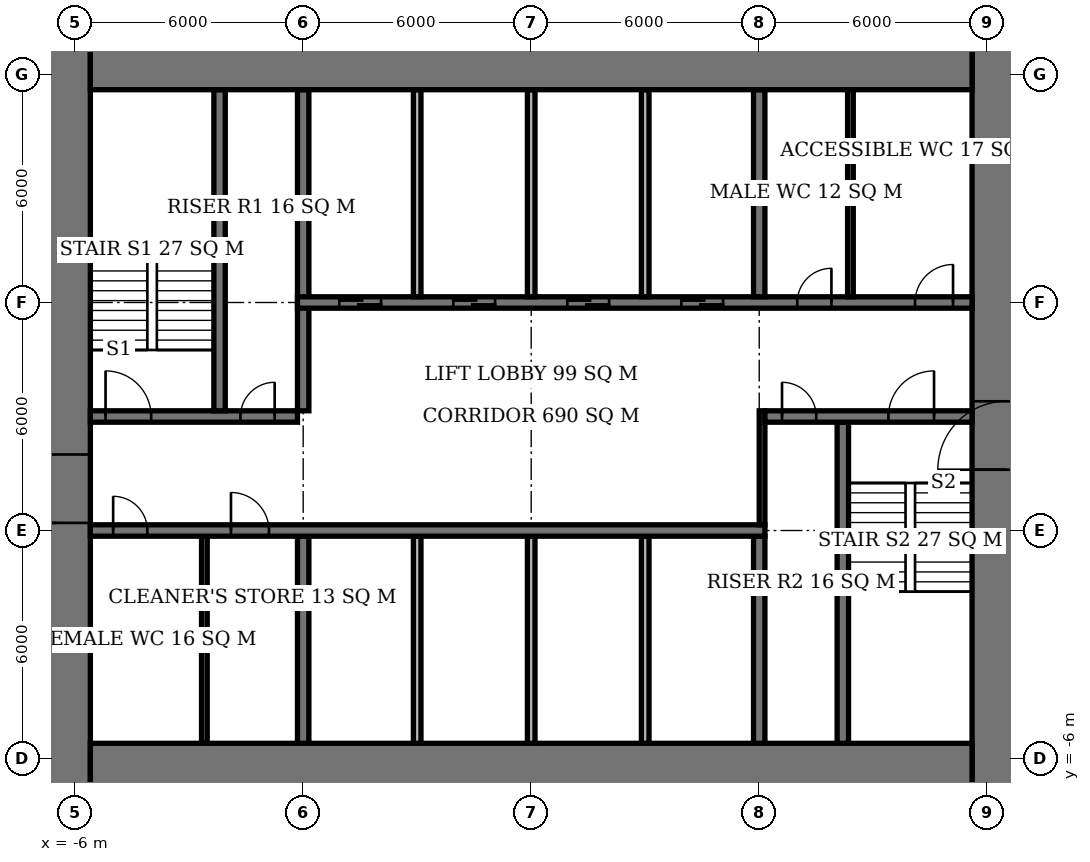
"""IFC4 building model, lengths in metres.
Left out: names, types, materials, properties, quantities, classifications, styles, units other than length and angle.
Written with IfcOpenShell. Run it as: python <this file> out.ifc"""

import sys

from ifc_helpers import new_model, si_unit, direction, frame, frame_2d, origin, place, context, subcontext, project, spatial, rectangle, extrude, element, fill, save


model = new_model("IFC4")
c1 = context("Model", 3, precision=1e-05, world=origin(), true_north=direction((0.0, 1.0)))
c2 = subcontext(c1, "Body", "Model", "MODEL_VIEW")
j1 = project(units=[si_unit("LENGTHUNIT", "METRE"), si_unit("PLANEANGLEUNIT", "RADIAN")], contexts=[c1])
p1 = place(None, origin())
s1 = spatial("IfcSite", under=j1, at=p1, CompositionType="ELEMENT")
p2 = place(p1, origin())
s2 = spatial("IfcBuilding", under=s1, at=p2, CompositionType="ELEMENT")
p3 = place(p2, frame((0.0, 0.0, 68.9)))
s3 = spatial("IfcBuildingStorey", under=s2, at=p3, CompositionType="ELEMENT", Elevation=68.9)
for number, where, z_axis, x_axis in (
    (1, (-5.6, -6.6, 0.0), (0.0, 0.0, 1.0), (1.0, 0.0, 0.0)),
    (2, (-5.6, 12.6, 0.0), (0.0, 0.0, 1.0), (1.0, 0.0, 0.0)),
):
    element("IfcWall", number, at=place(p3, frame(where, z_axis=z_axis, x_axis=x_axis)), inside=s3, PredefinedType="SHEAR", context=c2, shape_type="SweptSolid", body=[
        extrude(rectangle(XDim=23.2, YDim=2.0, at=frame_2d((11.6, 0.0))), origin(), (0.0, 0.0, 1.0), 3.9),
    ])
p4 = place(p3, frame((-6.5, -7.6, 0.0), z_axis=(0.0, 0.0, 1.0), x_axis=(0.0, 1.0, 0.0)))
e3 = element("IfcWall", 3, at=p4, inside=s3, PredefinedType="SHEAR", context=c2, shape_type="SweptSolid", body=[
    extrude(rectangle(XDim=21.2, YDim=1.8, at=frame_2d((10.6, 0.0))), origin(), (0.0, 0.0, 1.0), 3.9),
])
p5 = place(p4, frame((7.8, 0.0, 0.0)))
e4 = element("IfcOpeningElement", 4, at=p5, cuts=e3, PredefinedType="OPENING", context=c2, shape_type="SweptSolid", body=[
    extrude(rectangle(XDim=1.8, YDim=2.4, at=frame_2d((0.9, 1.2))), frame((0.0, 0.91, 0.0), z_axis=(0.0, -1.0, 0.0), x_axis=(1.0, 0.0, 0.0)), (0.0, 0.0, 1.0), 1.82),
])
p6 = place(p3, frame((18.5, -7.6, 0.0), z_axis=(0.0, 0.0, 1.0), x_axis=(0.0, 1.0, 0.0)))
e5 = element("IfcWall", 5, at=p6, inside=s3, PredefinedType="SHEAR", context=c2, shape_type="SweptSolid", body=[
    extrude(rectangle(XDim=21.2, YDim=1.8, at=frame_2d((10.6, 0.0))), origin(), (0.0, 0.0, 1.0), 3.9),
])
p7 = place(p6, frame((9.2, 0.0, 0.0)))
e6 = element("IfcOpeningElement", 6, at=p7, cuts=e5, PredefinedType="OPENING", context=c2, shape_type="SweptSolid", body=[
    extrude(rectangle(XDim=1.8, YDim=2.4, at=frame_2d((0.9, 1.2))), frame((0.0, 0.91, 0.0), z_axis=(0.0, -1.0, 0.0), x_axis=(1.0, 0.0, 0.0)), (0.0, 0.0, 1.0), 1.82),
])
p8 = place(p3, frame((-5.6, 0.0, 0.0), z_axis=(0.0, 0.0, 1.0), x_axis=(1.0, 0.0, 0.0)))
e7 = element("IfcWall", 7, at=p8, inside=s3, PredefinedType="SHEAR", context=c2, shape_type="SweptSolid", body=[
    extrude(rectangle(XDim=17.75, YDim=0.3, at=frame_2d((8.875, 0.0))), origin(), (0.0, 0.0, 1.0), 3.9),
])
p9 = place(p8, frame((0.6, 0.0, 0.0)))
e8 = element("IfcOpeningElement", 8, at=p9, cuts=e7, PredefinedType="OPENING", context=c2, shape_type="SweptSolid", body=[
    extrude(rectangle(XDim=0.9, YDim=2.1, at=frame_2d((0.45, 1.05))), frame((0.0, 0.16, 0.0), z_axis=(0.0, -1.0, 0.0), x_axis=(1.0, 0.0, 0.0)), (0.0, 0.0, 1.0), 0.32),
])
p10 = place(p8, frame((3.7, 0.0, 0.0)))
e9 = element("IfcOpeningElement", 9, at=p10, cuts=e7, PredefinedType="OPENING", context=c2, shape_type="SweptSolid", body=[
    extrude(rectangle(XDim=1.0, YDim=2.1, at=frame_2d((0.5, 1.05))), frame((0.0, 0.16, 0.0), z_axis=(0.0, -1.0, 0.0), x_axis=(1.0, 0.0, 0.0)), (0.0, 0.0, 1.0), 0.32),
])
p11 = place(p3, frame((-5.6, 3.0, 0.0), z_axis=(0.0, 0.0, 1.0), x_axis=(1.0, 0.0, 0.0)))
e10 = element("IfcWall", 10, at=p11, inside=s3, PredefinedType="SHEAR", context=c2, shape_type="SweptSolid", body=[
    extrude(rectangle(XDim=5.45, YDim=0.3, at=frame_2d((2.725, 0.0))), origin(), (0.0, 0.0, 1.0), 3.9),
])
p12 = place(p11, frame((0.4, 0.0, 0.0)))
e11 = element("IfcOpeningElement", 11, at=p12, cuts=e10, PredefinedType="OPENING", context=c2, shape_type="SweptSolid", body=[
    extrude(rectangle(XDim=1.2, YDim=2.1, at=frame_2d((0.6, 1.05))), frame((0.0, 0.16, 0.0), z_axis=(0.0, -1.0, 0.0), x_axis=(1.0, 0.0, 0.0)), (0.0, 0.0, 1.0), 0.32),
])
p13 = place(p11, frame((3.95, 0.0, 0.0)))
e12 = element("IfcOpeningElement", 12, at=p13, cuts=e10, PredefinedType="OPENING", context=c2, shape_type="SweptSolid", body=[
    extrude(rectangle(XDim=0.9, YDim=2.1, at=frame_2d((0.45, 1.05))), frame((0.0, 0.16, 0.0), z_axis=(0.0, -1.0, 0.0), x_axis=(1.0, 0.0, 0.0)), (0.0, 0.0, 1.0), 0.32),
])
p14 = place(p3, frame((12.15, 3.0, 0.0), z_axis=(0.0, 0.0, 1.0), x_axis=(1.0, 0.0, 0.0)))
e13 = element("IfcWall", 13, at=p14, inside=s3, PredefinedType="SHEAR", context=c2, shape_type="SweptSolid", body=[
    extrude(rectangle(XDim=5.45, YDim=0.3, at=frame_2d((2.725, 0.0))), origin(), (0.0, 0.0, 1.0), 3.9),
])
p15 = place(p14, frame((3.25, 0.0, 0.0)))
e14 = element("IfcOpeningElement", 14, at=p15, cuts=e13, PredefinedType="OPENING", context=c2, shape_type="SweptSolid", body=[
    extrude(rectangle(XDim=1.2, YDim=2.1, at=frame_2d((0.6, 1.05))), frame((0.0, 0.16, 0.0), z_axis=(0.0, -1.0, 0.0), x_axis=(1.0, 0.0, 0.0)), (0.0, 0.0, 1.0), 0.32),
])
p16 = place(p14, frame((0.45, 0.0, 0.0)))
e15 = element("IfcOpeningElement", 15, at=p16, cuts=e13, PredefinedType="OPENING", context=c2, shape_type="SweptSolid", body=[
    extrude(rectangle(XDim=0.9, YDim=2.1, at=frame_2d((0.45, 1.05))), frame((0.0, 0.16, 0.0), z_axis=(0.0, -1.0, 0.0), x_axis=(1.0, 0.0, 0.0)), (0.0, 0.0, 1.0), 0.32),
])
p17 = place(p3, frame((-0.15, 6.0, 0.0), z_axis=(0.0, 0.0, 1.0), x_axis=(1.0, 0.0, 0.0)))
e16 = element("IfcWall", 16, at=p17, inside=s3, PredefinedType="SHEAR", context=c2, shape_type="SweptSolid", body=[
    extrude(rectangle(XDim=17.75, YDim=0.3, at=frame_2d((8.875, 0.0))), origin(), (0.0, 0.0, 1.0), 3.9),
])
p18 = place(p17, frame((13.15, 0.0, 0.0)))
e17 = element("IfcOpeningElement", 17, at=p18, cuts=e16, PredefinedType="OPENING", context=c2, shape_type="SweptSolid", body=[
    extrude(rectangle(XDim=0.9, YDim=2.1, at=frame_2d((0.45, 1.05))), frame((0.0, 0.16, 0.0), z_axis=(0.0, -1.0, 0.0), x_axis=(1.0, 0.0, 0.0)), (0.0, 0.0, 1.0), 0.32),
])
p19 = place(p17, frame((16.25, 0.0, 0.0)))
e18 = element("IfcOpeningElement", 18, at=p19, cuts=e16, PredefinedType="OPENING", context=c2, shape_type="SweptSolid", body=[
    extrude(rectangle(XDim=1.0, YDim=2.1, at=frame_2d((0.5, 1.05))), frame((0.0, 0.16, 0.0), z_axis=(0.0, -1.0, 0.0), x_axis=(1.0, 0.0, 0.0)), (0.0, 0.0, 1.0), 0.32),
])
p20 = place(p17, frame((1.1, 0.0, 0.0)))
e19 = element("IfcOpeningElement", 19, at=p20, cuts=e16, PredefinedType="OPENING", context=c2, shape_type="SweptSolid", body=[
    extrude(rectangle(XDim=1.1, YDim=2.1, at=frame_2d((0.55, 1.05))), frame((0.0, 0.16, 0.0), z_axis=(0.0, -1.0, 0.0), x_axis=(1.0, 0.0, 0.0)), (0.0, 0.0, 1.0), 0.32),
])
p21 = place(p17, frame((4.1, 0.0, 0.0)))
e20 = element("IfcOpeningElement", 20, at=p21, cuts=e16, PredefinedType="OPENING", context=c2, shape_type="SweptSolid", body=[
    extrude(rectangle(XDim=1.1, YDim=2.1, at=frame_2d((0.55, 1.05))), frame((0.0, 0.16, 0.0), z_axis=(0.0, -1.0, 0.0), x_axis=(1.0, 0.0, 0.0)), (0.0, 0.0, 1.0), 0.32),
])
p22 = place(p17, frame((7.1, 0.0, 0.0)))
e21 = element("IfcOpeningElement", 21, at=p22, cuts=e16, PredefinedType="OPENING", context=c2, shape_type="SweptSolid", body=[
    extrude(rectangle(XDim=1.1, YDim=2.1, at=frame_2d((0.55, 1.05))), frame((0.0, 0.16, 0.0), z_axis=(0.0, -1.0, 0.0), x_axis=(1.0, 0.0, 0.0)), (0.0, 0.0, 1.0), 0.32),
])
p23 = place(p17, frame((10.1, 0.0, 0.0)))
e22 = element("IfcOpeningElement", 22, at=p23, cuts=e16, PredefinedType="OPENING", context=c2, shape_type="SweptSolid", body=[
    extrude(rectangle(XDim=1.1, YDim=2.1, at=frame_2d((0.55, 1.05))), frame((0.0, 0.16, 0.0), z_axis=(0.0, -1.0, 0.0), x_axis=(1.0, 0.0, 0.0)), (0.0, 0.0, 1.0), 0.32),
])
p24 = place(p3, frame((0.0, -5.6, 0.0), z_axis=(0.0, 0.0, 1.0), x_axis=(0.0, 1.0, 0.0)))
e23 = element("IfcWall", 23, at=p24, inside=s3, PredefinedType="SHEAR", context=c2, shape_type="SweptSolid", body=[
    extrude(rectangle(XDim=5.45, YDim=0.3, at=frame_2d((2.725, 0.0))), origin(), (0.0, 0.0, 1.0), 3.9),
])
p25 = place(p3, frame((0.0, 3.15, 0.0), z_axis=(0.0, 0.0, 1.0), x_axis=(0.0, 1.0, 0.0)))
e24 = element("IfcWall", 24, at=p25, inside=s3, PredefinedType="SHEAR", context=c2, shape_type="SweptSolid", body=[
    extrude(rectangle(XDim=8.45, YDim=0.3, at=frame_2d((4.225, 0.0))), origin(), (0.0, 0.0, 1.0), 3.9),
])
for number, where, z_axis, x_axis in (
    (25, (12.0, -5.6, 0.0), (0.0, 0.0, 1.0), (0.0, 1.0, 0.0)),
    (26, (12.0, 6.15, 0.0), (0.0, 0.0, 1.0), (0.0, 1.0, 0.0)),
):
    element("IfcWall", number, at=place(p3, frame(where, z_axis=z_axis, x_axis=x_axis)), inside=s3, PredefinedType="SHEAR", context=c2, shape_type="SweptSolid", body=[
        extrude(rectangle(XDim=5.45, YDim=0.3, at=frame_2d((2.725, 0.0))), origin(), (0.0, 0.0, 1.0), 3.9),
    ])
for number, where, z_axis, x_axis in (
    (27, (-2.2, 3.15, 0.0), (0.0, 0.0, 1.0), (0.0, 1.0, 0.0)),
    (28, (14.2, -5.6, 0.0), (0.0, 0.0, 1.0), (0.0, 1.0, 0.0)),
):
    element("IfcWall", number, at=place(p3, frame(where, z_axis=z_axis, x_axis=x_axis)), inside=s3, PredefinedType="SHEAR", context=c2, shape_type="SweptSolid", body=[
        extrude(rectangle(XDim=8.45, YDim=0.3, at=frame_2d((4.225, 0.0))), origin(), (0.0, 0.0, 1.0), 3.9),
    ])
for number, where, z_axis, x_axis in (
    (29, (3.0, 6.15, 0.0), (0.0, 0.0, 1.0), (0.0, 1.0, 0.0)),
    (30, (6.0, 6.15, 0.0), (0.0, 0.0, 1.0), (0.0, 1.0, 0.0)),
    (31, (9.0, 6.15, 0.0), (0.0, 0.0, 1.0), (0.0, 1.0, 0.0)),
    (32, (3.0, -5.6, 0.0), (0.0, 0.0, 1.0), (0.0, 1.0, 0.0)),
    (33, (6.0, -5.6, 0.0), (0.0, 0.0, 1.0), (0.0, 1.0, 0.0)),
    (34, (9.0, -5.6, 0.0), (0.0, 0.0, 1.0), (0.0, 1.0, 0.0)),
):
    element("IfcWall", number, at=place(p3, frame(where, z_axis=z_axis, x_axis=x_axis)), inside=s3, PredefinedType="SOLIDWALL", context=c2, shape_type="SweptSolid", body=[
        extrude(rectangle(XDim=5.45, YDim=0.2, at=frame_2d((2.725, 0.0))), origin(), (0.0, 0.0, 1.0), 3.9),
    ])
for number, where, z_axis, x_axis in (
    (35, (-2.6, -5.6, 0.0), (0.0, 0.0, 1.0), (0.0, 1.0, 0.0)),
    (36, (14.4, 6.15, 0.0), (0.0, 0.0, 1.0), (0.0, 1.0, 0.0)),
):
    element("IfcWall", number, at=place(p3, frame(where, z_axis=z_axis, x_axis=x_axis)), inside=s3, PredefinedType="PLUMBINGWALL", context=c2, shape_type="SweptSolid", body=[
        extrude(rectangle(XDim=5.45, YDim=0.15, at=frame_2d((2.725, 0.0))), origin(), (0.0, 0.0, 1.0), 3.65),
    ])
p26 = place(p3, frame((12.075, 0.15, 0.0), z_axis=(0.0, 0.0, 1.0), x_axis=(0.0, 1.0, 0.0)))
e37 = element("IfcWall", 37, at=p26, inside=s3, PredefinedType="PARTITIONING", context=c2, shape_type="SweptSolid", body=[
    extrude(rectangle(XDim=3.0, YDim=0.15, at=frame_2d((1.5, 0.0))), origin(), (0.0, 0.0, 1.0), 3.65),
])
p27 = place(p5, origin())
e38 = element("IfcDoor", 38, at=p27, inside=s3, OperationType="DOUBLE_DOOR_SINGLE_SWING", PredefinedType="DOOR", context=c2, shape_type="SweptSolid", body=[
    extrude(rectangle(XDim=1.8, YDim=2.4, at=frame_2d((0.9, 1.2))), frame((0.0, 0.025, 0.0), z_axis=(0.0, -1.0, 0.0), x_axis=(1.0, 0.0, 0.0)), (0.0, 0.0, 1.0), 0.05),
])
fill(e4, e38)
p28 = place(p7, origin())
e39 = element("IfcDoor", 39, at=p28, inside=s3, OperationType="DOUBLE_DOOR_SINGLE_SWING", PredefinedType="DOOR", context=c2, shape_type="SweptSolid", body=[
    extrude(rectangle(XDim=1.8, YDim=2.4, at=frame_2d((0.9, 1.2))), frame((0.0, 0.025, 0.0), z_axis=(0.0, -1.0, 0.0), x_axis=(1.0, 0.0, 0.0)), (0.0, 0.0, 1.0), 0.05),
])
fill(e6, e39)
p29 = place(p12, origin())
e40 = element("IfcDoor", 40, at=p29, inside=s3, OperationType="SINGLE_SWING_LEFT", PredefinedType="DOOR", context=c2, shape_type="SweptSolid", body=[
    extrude(rectangle(XDim=1.2, YDim=2.1, at=frame_2d((0.6, 1.05))), frame((0.0, 0.025, 0.0), z_axis=(0.0, -1.0, 0.0), x_axis=(1.0, 0.0, 0.0)), (0.0, 0.0, 1.0), 0.05),
])
fill(e11, e40)
p30 = place(p13, origin())
e41 = element("IfcDoor", 41, at=p30, inside=s3, OperationType="SINGLE_SWING_RIGHT", PredefinedType="DOOR", context=c2, shape_type="SweptSolid", body=[
    extrude(rectangle(XDim=0.9, YDim=2.1, at=frame_2d((0.45, 1.05))), frame((0.0, 0.025, 0.0), z_axis=(0.0, -1.0, 0.0), x_axis=(1.0, 0.0, 0.0)), (0.0, 0.0, 1.0), 0.05),
])
fill(e12, e41)
p31 = place(p15, origin())
e42 = element("IfcDoor", 42, at=p31, inside=s3, OperationType="SINGLE_SWING_RIGHT", PredefinedType="DOOR", context=c2, shape_type="SweptSolid", body=[
    extrude(rectangle(XDim=1.2, YDim=2.1, at=frame_2d((0.6, 1.05))), frame((0.0, 0.025, 0.0), z_axis=(0.0, -1.0, 0.0), x_axis=(1.0, 0.0, 0.0)), (0.0, 0.0, 1.0), 0.05),
])
fill(e14, e42)
p32 = place(p16, origin())
e43 = element("IfcDoor", 43, at=p32, inside=s3, OperationType="SINGLE_SWING_LEFT", PredefinedType="DOOR", context=c2, shape_type="SweptSolid", body=[
    extrude(rectangle(XDim=0.9, YDim=2.1, at=frame_2d((0.45, 1.05))), frame((0.0, 0.025, 0.0), z_axis=(0.0, -1.0, 0.0), x_axis=(1.0, 0.0, 0.0)), (0.0, 0.0, 1.0), 0.05),
])
fill(e15, e43)
p33 = place(p9, origin())
e44 = element("IfcDoor", 44, at=p33, inside=s3, OperationType="SINGLE_SWING_LEFT", PredefinedType="DOOR", context=c2, shape_type="SweptSolid", body=[
    extrude(rectangle(XDim=0.9, YDim=2.1, at=frame_2d((0.45, 1.05))), frame((0.0, 0.025, 0.0), z_axis=(0.0, -1.0, 0.0), x_axis=(1.0, 0.0, 0.0)), (0.0, 0.0, 1.0), 0.05),
])
fill(e8, e44)
p34 = place(p10, origin())
e45 = element("IfcDoor", 45, at=p34, inside=s3, OperationType="SINGLE_SWING_LEFT", PredefinedType="DOOR", context=c2, shape_type="SweptSolid", body=[
    extrude(rectangle(XDim=1.0, YDim=2.1, at=frame_2d((0.5, 1.05))), frame((0.0, 0.025, 0.0), z_axis=(0.0, -1.0, 0.0), x_axis=(1.0, 0.0, 0.0)), (0.0, 0.0, 1.0), 0.05),
])
fill(e9, e45)
p35 = place(p18, origin())
e46 = element("IfcDoor", 46, at=p35, inside=s3, OperationType="SINGLE_SWING_RIGHT", PredefinedType="DOOR", context=c2, shape_type="SweptSolid", body=[
    extrude(rectangle(XDim=0.9, YDim=2.1, at=frame_2d((0.45, 1.05))), frame((0.0, 0.025, 0.0), z_axis=(0.0, -1.0, 0.0), x_axis=(1.0, 0.0, 0.0)), (0.0, 0.0, 1.0), 0.05),
])
fill(e17, e46)
p36 = place(p19, origin())
e47 = element("IfcDoor", 47, at=p36, inside=s3, OperationType="SINGLE_SWING_RIGHT", PredefinedType="DOOR", context=c2, shape_type="SweptSolid", body=[
    extrude(rectangle(XDim=1.0, YDim=2.1, at=frame_2d((0.5, 1.05))), frame((0.0, 0.025, 0.0), z_axis=(0.0, -1.0, 0.0), x_axis=(1.0, 0.0, 0.0)), (0.0, 0.0, 1.0), 0.05),
])
fill(e18, e47)
p37 = place(p20, origin())
e48 = element("IfcDoor", 48, at=p37, inside=s3, OperationType="DOUBLE_DOOR_SLIDING", PredefinedType="USERDEFINED", context=c2, shape_type="SweptSolid", body=[
    extrude(rectangle(XDim=1.1, YDim=2.1, at=frame_2d((0.55, 1.05))), frame((0.0, 0.025, 0.0), z_axis=(0.0, -1.0, 0.0), x_axis=(1.0, 0.0, 0.0)), (0.0, 0.0, 1.0), 0.05),
])
fill(e19, e48)
p38 = place(p21, origin())
e49 = element("IfcDoor", 49, at=p38, inside=s3, OperationType="DOUBLE_DOOR_SLIDING", PredefinedType="USERDEFINED", context=c2, shape_type="SweptSolid", body=[
    extrude(rectangle(XDim=1.1, YDim=2.1, at=frame_2d((0.55, 1.05))), frame((0.0, 0.025, 0.0), z_axis=(0.0, -1.0, 0.0), x_axis=(1.0, 0.0, 0.0)), (0.0, 0.0, 1.0), 0.05),
])
fill(e20, e49)
p39 = place(p22, origin())
e50 = element("IfcDoor", 50, at=p39, inside=s3, OperationType="DOUBLE_DOOR_SLIDING", PredefinedType="USERDEFINED", context=c2, shape_type="SweptSolid", body=[
    extrude(rectangle(XDim=1.1, YDim=2.1, at=frame_2d((0.55, 1.05))), frame((0.0, 0.025, 0.0), z_axis=(0.0, -1.0, 0.0), x_axis=(1.0, 0.0, 0.0)), (0.0, 0.0, 1.0), 0.05),
])
fill(e21, e50)
p40 = place(p23, origin())
e51 = element("IfcDoor", 51, at=p40, inside=s3, OperationType="DOUBLE_DOOR_SLIDING", PredefinedType="USERDEFINED", context=c2, shape_type="SweptSolid", body=[
    extrude(rectangle(XDim=1.1, YDim=2.1, at=frame_2d((0.55, 1.05))), frame((0.0, 0.025, 0.0), z_axis=(0.0, -1.0, 0.0), x_axis=(1.0, 0.0, 0.0)), (0.0, 0.0, 1.0), 0.05),
])
fill(e22, e51)
save(model, sys.argv[1])
